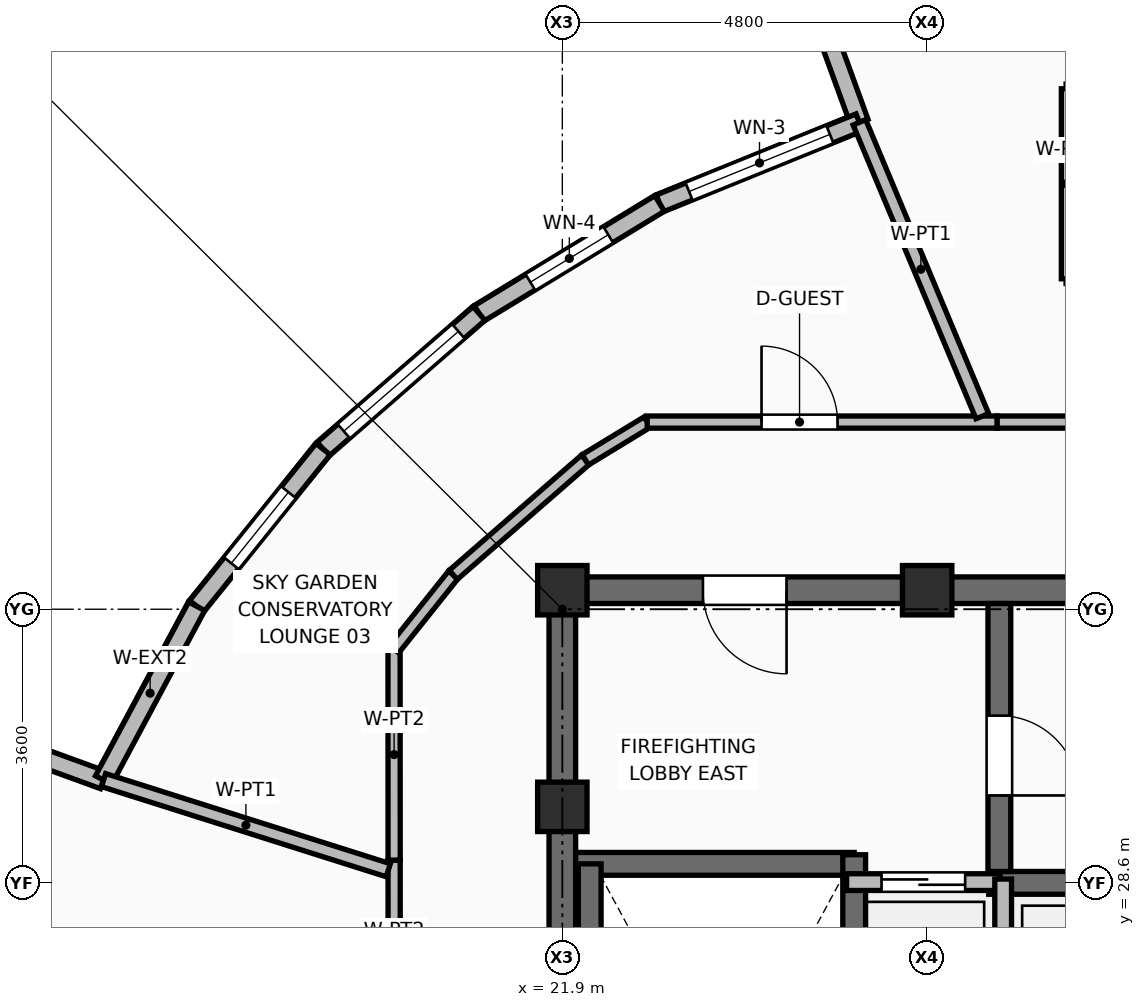
"""IFC4 building model, lengths in metres.
Left out: names, types, materials, properties, quantities, classifications, styles, units other than length and angle.
Written with IfcOpenShell. Run it as: python <this file> out.ifc"""

import sys

from ifc_helpers import new_model, si_unit, direction, frame, frame_2d, origin, origin_2d, place, context, subcontext, project, spatial, rectangle, extrude, element, fill, save


model = new_model("IFC4")
c1 = context("Model", 3, precision=1e-05, world=origin(), true_north=direction((0.0, 1.0)))
c2 = subcontext(c1, "Body", "Model", "MODEL_VIEW")
j1 = project(units=[si_unit("LENGTHUNIT", "METRE"), si_unit("PLANEANGLEUNIT", "RADIAN")], contexts=[c1])
p1 = place(None, origin())
s1 = spatial("IfcSite", under=j1, at=p1, CompositionType="ELEMENT")
p2 = place(p1, origin())
s2 = spatial("IfcBuilding", under=s1, at=p2, CompositionType="ELEMENT")
p3 = place(p2, frame((0.0, 0.0, 275.1)))
s3 = spatial("IfcBuildingStorey", under=s2, at=p3, CompositionType="ELEMENT", Elevation=275.1)
for number, where, z_axis, x_axis in (
    (1, (21.9, 29.6, 0.0), (0.0, 0.0, 1.0), (1.0, 0.0, 0.0)),
    (2, (21.9, 32.45, 0.0), (0.0, 0.0, 1.0), (1.0, 0.0, 0.0)),
    (3, (26.7, 32.45, 0.0), (0.0, 0.0, 1.0), (1.0, 0.0, 0.0)),
):
    element("IfcColumn", number, at=place(p3, frame(where, z_axis=z_axis, x_axis=x_axis)), inside=s3, PredefinedType="COLUMN", context=c2, shape_type="SweptSolid", body=[
        extrude(rectangle(XDim=0.65, YDim=0.65, at=origin_2d()), origin(), (0.0, 0.0, 1.0), 3.75),
    ])
for number, where, z_axis, x_axis in (
    (4, (24.646, 41.8, 0.0), (0.0, 0.0, 1.0), (0.342, -0.94, 0.0)),
    (5, (15.864, 29.952, 0.0), (0.0, 0.0, 1.0), (-0.94, 0.342, 0.0)),
):
    element("IfcWall", number, at=place(p3, frame(where, z_axis=z_axis, x_axis=x_axis)), inside=s3, PredefinedType="SOLIDWALL", context=c2, shape_type="SweptSolid", body=[
        extrude(rectangle(XDim=3.4, YDim=0.24, at=frame_2d((1.7, 0.0))), origin(), (0.0, 0.0, 1.0), 3.57),
    ])
p4 = place(p3, frame((25.809, 38.605, 0.0), z_axis=(0.0, 0.0, 1.0), x_axis=(-0.926613712396, -0.376014664608, 0.0)))
e6 = element("IfcWall", 6, at=p4, inside=s3, PredefinedType="SOLIDWALL", context=c2, shape_type="SweptSolid", body=[
    extrude(rectangle(XDim=2.837, YDim=0.24, at=frame_2d((1.419, 0.0))), origin(), (0.0, 0.0, 1.0), 3.57),
])
p5 = place(p4, frame((0.419, 0.0, 0.85)))
e7 = element("IfcOpeningElement", 7, at=p5, cuts=e6, PredefinedType="OPENING", context=c2, shape_type="SweptSolid", body=[
    extrude(rectangle(XDim=2.0, YDim=2.4, at=frame_2d((1.0, 1.2))), frame((0.0, 0.13, 0.0), z_axis=(0.0, -1.0, 0.0), x_axis=(1.0, 0.0, 0.0)), (0.0, 0.0, 1.0), 0.26),
])
p6 = place(p3, frame((23.18, 37.538, 0.0), z_axis=(0.0, 0.0, 1.0), x_axis=(-0.854074820895, -0.520150170925, 0.0)))
e8 = element("IfcWall", 8, at=p6, inside=s3, PredefinedType="SOLIDWALL", context=c2, shape_type="SweptSolid", body=[
    extrude(rectangle(XDim=2.782, YDim=0.24, at=frame_2d((1.391, 0.0))), origin(), (0.0, 0.0, 1.0), 3.57),
])
p7 = place(p6, frame((0.791, 0.0, 0.85)))
e9 = element("IfcOpeningElement", 9, at=p7, cuts=e8, PredefinedType="OPENING", context=c2, shape_type="SweptSolid", body=[
    extrude(rectangle(XDim=1.2, YDim=1.8, at=frame_2d((0.6, 0.9))), frame((0.0, 0.13, 0.0), z_axis=(0.0, -1.0, 0.0), x_axis=(1.0, 0.0, 0.0)), (0.0, 0.0, 1.0), 0.26),
])
p8 = place(p3, frame((20.804, 36.091, 0.0), z_axis=(0.0, 0.0, 1.0), x_axis=(-0.754303896014, -0.656525424075, 0.0)))
e10 = element("IfcWall", 10, at=p8, inside=s3, PredefinedType="SOLIDWALL", context=c2, shape_type="SweptSolid", body=[
    extrude(rectangle(XDim=2.719, YDim=0.24, at=frame_2d((1.359, 0.0))), origin(), (0.0, 0.0, 1.0), 3.57),
])
p9 = place(p8, frame((0.359, 0.0, 0.85)))
e11 = element("IfcOpeningElement", 11, at=p9, cuts=e10, PredefinedType="OPENING", context=c2, shape_type="SweptSolid", body=[
    extrude(rectangle(XDim=2.0, YDim=2.4, at=frame_2d((1.0, 1.2))), frame((0.0, 0.13, 0.0), z_axis=(0.0, -1.0, 0.0), x_axis=(1.0, 0.0, 0.0)), (0.0, 0.0, 1.0), 0.26),
])
p10 = place(p3, frame((18.753, 34.306, 0.0), z_axis=(0.0, 0.0, 1.0), x_axis=(-0.627059794428, -0.778971125403, 0.0)))
e12 = element("IfcWall", 12, at=p10, inside=s3, PredefinedType="SOLIDWALL", context=c2, shape_type="SweptSolid", body=[
    extrude(rectangle(XDim=2.653, YDim=0.24, at=frame_2d((1.327, 0.0))), origin(), (0.0, 0.0, 1.0), 3.57),
])
p11 = place(p10, frame((0.727, 0.0, 0.85)))
e13 = element("IfcOpeningElement", 13, at=p11, cuts=e12, PredefinedType="OPENING", context=c2, shape_type="SweptSolid", body=[
    extrude(rectangle(XDim=1.2, YDim=1.8, at=frame_2d((0.6, 0.9))), frame((0.0, 0.13, 0.0), z_axis=(0.0, -1.0, 0.0), x_axis=(1.0, 0.0, 0.0)), (0.0, 0.0, 1.0), 0.26),
])
p12 = place(p3, frame((17.089, 32.239, 0.0), z_axis=(0.0, 0.0, 1.0), x_axis=(-0.472179632466, -0.881502350924, 0.0)))
e14 = element("IfcWall", 14, at=p12, inside=s3, PredefinedType="SOLIDWALL", context=c2, shape_type="SweptSolid", body=[
    extrude(rectangle(XDim=2.594, YDim=0.24, at=frame_2d((1.297, 0.0))), origin(), (0.0, 0.0, 1.0), 3.57),
])
p13 = place(p3, frame((21.725, 32.45, 0.0), z_axis=(0.0, 0.0, 1.0), x_axis=(1.0, 0.0, 0.0)))
e15 = element("IfcWall", 15, at=p13, inside=s3, PredefinedType="SHEAR", context=c2, shape_type="SweptSolid", body=[
    extrude(rectangle(XDim=19.55, YDim=0.35, at=frame_2d((9.775, 0.0))), origin(), (0.0, 0.0, 1.0), 3.57),
])
p14 = place(p13, frame((2.025, 0.0, 0.0)))
e16 = element("IfcOpeningElement", 16, at=p14, cuts=e15, PredefinedType="OPENING", context=c2, shape_type="SweptSolid", body=[
    extrude(rectangle(XDim=1.1, YDim=2.1, at=frame_2d((0.55, 1.05))), frame((0.0, 0.185, 0.0), z_axis=(0.0, -1.0, 0.0), x_axis=(1.0, 0.0, 0.0)), (0.0, 0.0, 1.0), 0.37),
])
p15 = place(p13, frame((15.415, 0.0, 0.0)))
e17 = element("IfcOpeningElement", 17, at=p15, cuts=e15, PredefinedType="OPENING", context=c2, shape_type="SweptSolid", body=[
    extrude(rectangle(XDim=1.0, YDim=2.1, at=frame_2d((0.5, 1.05))), frame((0.0, 0.185, 0.0), z_axis=(0.0, -1.0, 0.0), x_axis=(1.0, 0.0, 0.0)), (0.0, 0.0, 1.0), 0.37),
])
p16 = place(p13, frame((17.425, 0.0, 0.0)))
e18 = element("IfcOpeningElement", 18, at=p16, cuts=e15, PredefinedType="OPENING", context=c2, shape_type="SweptSolid", body=[
    extrude(rectangle(XDim=0.9, YDim=2.1, at=frame_2d((0.45, 1.05))), frame((0.0, 0.185, 0.0), z_axis=(0.0, -1.0, 0.0), x_axis=(1.0, 0.0, 0.0)), (0.0, 0.0, 1.0), 0.37),
])
p17 = place(p3, frame((21.9, 17.975, 0.0), z_axis=(0.0, 0.0, 1.0), x_axis=(0.0, 1.0, 0.0)))
e19 = element("IfcWall", 19, at=p17, inside=s3, PredefinedType="SHEAR", context=c2, shape_type="SweptSolid", body=[
    extrude(rectangle(XDim=14.3, YDim=0.35, at=frame_2d((7.15, 0.0))), origin(), (0.0, 0.0, 1.0), 3.57),
])
p18 = place(p3, frame((22.075, 28.85, 0.0), z_axis=(0.0, 0.0, 1.0), x_axis=(1.0, 0.0, 0.0)))
e20 = element("IfcWall", 20, at=p18, inside=s3, PredefinedType="SHEAR", context=c2, shape_type="SweptSolid", body=[
    extrude(rectangle(XDim=3.665, YDim=0.3, at=frame_2d((1.833, 0.0))), origin(), (0.0, 0.0, 1.0), 3.57),
])
p19 = place(p3, frame((25.74, 20.98, 0.0), z_axis=(0.0, 0.0, 1.0), x_axis=(0.0, 1.0, 0.0)))
e21 = element("IfcWall", 21, at=p19, inside=s3, PredefinedType="SHEAR", context=c2, shape_type="SweptSolid", body=[
    extrude(rectangle(XDim=7.99, YDim=0.3, at=frame_2d((3.995, 0.0))), origin(), (0.0, 0.0, 1.0), 3.57),
])
p20 = place(p3, frame((22.26, 21.1, 0.0), z_axis=(0.0, 0.0, 1.0), x_axis=(0.0, 1.0, 0.0)))
e22 = element("IfcWall", 22, at=p20, inside=s3, PredefinedType="SHEAR", context=c2, shape_type="SweptSolid", body=[
    extrude(rectangle(XDim=7.75, YDim=0.3, at=frame_2d((3.875, 0.0))), origin(), (0.0, 0.0, 1.0), 3.57),
])
p21 = place(p3, frame((27.51, 28.6, 0.0), z_axis=(0.0, 0.0, 1.0), x_axis=(1.0, 0.0, 0.0)))
e23 = element("IfcWall", 23, at=p21, inside=s3, PredefinedType="SHEAR", context=c2, shape_type="SweptSolid", body=[
    extrude(rectangle(XDim=8.03, YDim=0.3, at=frame_2d((4.015, 0.0))), origin(), (0.0, 0.0, 1.0), 3.57),
])
p22 = place(p3, frame((27.65, 28.75, 0.0), z_axis=(0.0, 0.0, 1.0), x_axis=(0.0, 1.0, 0.0)))
e24 = element("IfcWall", 24, at=p22, inside=s3, PredefinedType="SHEAR", context=c2, shape_type="SweptSolid", body=[
    extrude(rectangle(XDim=3.525, YDim=0.3, at=frame_2d((1.762, 0.0))), origin(), (0.0, 0.0, 1.0), 3.57),
])
p23 = place(p22, frame((1.0, 0.0, 0.0)))
e25 = element("IfcOpeningElement", 25, at=p23, cuts=e24, PredefinedType="OPENING", context=c2, shape_type="SweptSolid", body=[
    extrude(rectangle(XDim=1.05, YDim=2.1, at=frame_2d((0.525, 1.05))), frame((0.0, 0.16, 0.0), z_axis=(0.0, -1.0, 0.0), x_axis=(1.0, 0.0, 0.0)), (0.0, 0.0, 1.0), 0.32),
])
p24 = place(p3, frame((25.64, 28.61, 0.0), z_axis=(0.0, 0.0, 1.0), x_axis=(1.0, 0.0, 0.0)))
e26 = element("IfcWall", 26, at=p24, inside=s3, PredefinedType="PARTITIONING", context=c2, shape_type="SweptSolid", body=[
    extrude(rectangle(XDim=2.02, YDim=0.22, at=frame_2d((1.01, 0.0))), origin(), (0.0, 0.0, 1.0), 3.55),
])
p25 = place(p24, frame((0.46, 0.0, 0.0)))
e27 = element("IfcOpeningElement", 27, at=p25, cuts=e26, PredefinedType="OPENING", context=c2, shape_type="SweptSolid", body=[
    extrude(rectangle(XDim=1.1, YDim=2.2, at=frame_2d((0.55, 1.1))), frame((0.0, 0.12, 0.0), z_axis=(0.0, -1.0, 0.0), x_axis=(1.0, 0.0, 0.0)), (0.0, 0.0, 1.0), 0.24),
])
p26 = place(p3, frame((27.7, 25.65, 0.0), z_axis=(0.0, 0.0, 1.0), x_axis=(0.0, 1.0, 0.0)))
e28 = element("IfcWall", 28, at=p26, inside=s3, PredefinedType="PARTITIONING", context=c2, shape_type="SweptSolid", body=[
    extrude(rectangle(XDim=3.0, YDim=0.22, at=frame_2d((1.5, 0.0))), origin(), (0.0, 0.0, 1.0), 3.55),
])
p27 = place(p3, frame((19.688, 26.135, 0.0), z_axis=(0.0, 0.0, 1.0), x_axis=(-0.000353325656, 0.99999993758, 0.0)))
e29 = element("IfcWall", 29, at=p27, inside=s3, PredefinedType="PARTITIONING", context=c2, shape_type="SweptSolid", body=[
    extrude(rectangle(XDim=2.764, YDim=0.16, at=frame_2d((1.382, 0.0))), origin(), (0.0, 0.0, 1.0), 3.55),
])
p28 = place(p3, frame((19.687, 28.899, 0.0), z_axis=(0.0, 0.0, 1.0), x_axis=(-0.00035164833, 0.999999938172, 0.0)))
e30 = element("IfcWall", 30, at=p28, inside=s3, PredefinedType="PARTITIONING", context=c2, shape_type="SweptSolid", body=[
    extrude(rectangle(XDim=2.777, YDim=0.16, at=frame_2d((1.389, 0.0))), origin(), (0.0, 0.0, 1.0), 3.55),
])
p29 = place(p3, frame((19.686, 31.676, 0.0), z_axis=(0.0, 0.0, 1.0), x_axis=(0.623812554347, 0.781573986926, 0.0)))
e31 = element("IfcWall", 31, at=p29, inside=s3, PredefinedType="PARTITIONING", context=c2, shape_type="SweptSolid", body=[
    extrude(rectangle(XDim=1.249, YDim=0.16, at=frame_2d((0.625, 0.0))), origin(), (0.0, 0.0, 1.0), 3.132),
])
p30 = place(p3, frame((20.465, 32.652, 0.0), z_axis=(0.0, 0.0, 1.0), x_axis=(0.754005434477, 0.65686817915, 0.0)))
e32 = element("IfcWall", 32, at=p30, inside=s3, PredefinedType="PARTITIONING", context=c2, shape_type="SweptSolid", body=[
    extrude(rectangle(XDim=2.305, YDim=0.16, at=frame_2d((1.152, 0.0))), origin(), (0.0, 0.0, 1.0), 3.132),
])
p31 = place(p3, frame((22.203, 34.166, 0.0), z_axis=(0.0, 0.0, 1.0), x_axis=(0.853971019055, 0.52032057293, 0.0)))
e33 = element("IfcWall", 33, at=p31, inside=s3, PredefinedType="PARTITIONING", context=c2, shape_type="SweptSolid", body=[
    extrude(rectangle(XDim=0.953, YDim=0.16, at=frame_2d((0.477, 0.0))), origin(), (0.0, 0.0, 1.0), 3.55),
])
p32 = place(p3, frame((23.017, 34.662, 0.0), z_axis=(0.0, 0.0, 1.0), x_axis=(1.0, 0.0, 0.0)))
e34 = element("IfcWall", 34, at=p32, inside=s3, PredefinedType="PARTITIONING", context=c2, shape_type="SweptSolid", body=[
    extrude(rectangle(XDim=4.605, YDim=0.16, at=frame_2d((2.302, 0.0))), origin(), (0.0, 0.0, 1.0), 3.55),
])
p33 = place(p32, frame((1.504, 0.0, 0.0)))
e35 = element("IfcOpeningElement", 35, at=p33, cuts=e34, PredefinedType="OPENING", context=c2, shape_type="SweptSolid", body=[
    extrude(rectangle(XDim=1.0, YDim=2.1, at=frame_2d((0.5, 1.05))), frame((0.0, 0.09, 0.0), z_axis=(0.0, -1.0, 0.0), x_axis=(1.0, 0.0, 0.0)), (0.0, 0.0, 1.0), 0.18),
])
p34 = place(p3, frame((27.622, 34.662, 0.0), z_axis=(0.0, 0.0, 1.0), x_axis=(0.999999992592, -0.000121719654, 0.0)))
e36 = element("IfcWall", 36, at=p34, inside=s3, PredefinedType="PARTITIONING", context=c2, shape_type="SweptSolid", body=[
    extrude(rectangle(XDim=10.029, YDim=0.16, at=frame_2d((5.014, 0.0))), origin(), (0.0, 0.0, 1.0), 3.132),
])
p35 = place(p34, frame((4.34, 0.0, 0.0)))
e37 = element("IfcOpeningElement", 37, at=p35, cuts=e36, PredefinedType="OPENING", context=c2, shape_type="SweptSolid", body=[
    extrude(rectangle(XDim=1.2, YDim=2.1, at=frame_2d((0.6, 1.05))), frame((0.0, 0.09, 0.0), z_axis=(0.0, -1.0, 0.0), x_axis=(1.0, 0.0, 0.0)), (0.0, 0.0, 1.0), 0.18),
])
p36 = place(p3, frame((27.426, 34.74, 0.0), z_axis=(0.0, 0.0, 1.0), x_axis=(-0.385943200944, 0.92252254479, 0.0)))
e38 = element("IfcWall", 38, at=p36, inside=s3, PredefinedType="PARTITIONING", context=c2, shape_type="SweptSolid", body=[
    extrude(rectangle(XDim=4.19, YDim=0.18, at=frame_2d((2.095, 0.0))), origin(), (0.0, 0.0, 1.0), 3.55),
])
p37 = place(p3, frame((19.61, 28.766, 0.0), z_axis=(0.0, 0.0, 1.0), x_axis=(-0.953376791754, 0.301782525909, 0.0)))
e39 = element("IfcWall", 39, at=p37, inside=s3, PredefinedType="PARTITIONING", context=c2, shape_type="SweptSolid", body=[
    extrude(rectangle(XDim=3.929, YDim=0.18, at=frame_2d((1.965, 0.0))), origin(), (0.0, 0.0, 1.0), 3.55),
])
p38 = place(p3, frame((28.528, 36.547, 0.0), z_axis=(0.0, 0.0, 1.0), x_axis=(0.0, 1.0, 0.0)))
e40 = element("IfcWall", 40, at=p38, inside=s3, PredefinedType="PARTITIONING", context=c2, shape_type="SweptSolid", body=[
    extrude(rectangle(XDim=2.5, YDim=0.125, at=frame_2d((1.25, 0.0))), origin(), (0.0, 0.0, 1.0), 3.55),
])
p39 = place(p5, origin())
e41 = element("IfcWindow", 41, at=p39, inside=s3, PartitioningType="SINGLE_PANEL", PredefinedType="WINDOW", context=c2, shape_type="SweptSolid", body=[
    extrude(rectangle(XDim=2.0, YDim=2.4, at=frame_2d((1.0, 1.2))), frame((0.0, 0.03, 0.0), z_axis=(0.0, -1.0, 0.0), x_axis=(1.0, 0.0, 0.0)), (0.0, 0.0, 1.0), 0.06),
])
fill(e7, e41)
p40 = place(p7, origin())
e42 = element("IfcWindow", 42, at=p40, inside=s3, PartitioningType="SINGLE_PANEL", PredefinedType="WINDOW", context=c2, shape_type="SweptSolid", body=[
    extrude(rectangle(XDim=1.2, YDim=1.8, at=frame_2d((0.6, 0.9))), frame((0.0, 0.03, 0.0), z_axis=(0.0, -1.0, 0.0), x_axis=(1.0, 0.0, 0.0)), (0.0, 0.0, 1.0), 0.06),
])
fill(e9, e42)
p41 = place(p9, origin())
e43 = element("IfcWindow", 43, at=p41, inside=s3, PartitioningType="SINGLE_PANEL", PredefinedType="WINDOW", context=c2, shape_type="SweptSolid", body=[
    extrude(rectangle(XDim=2.0, YDim=2.4, at=frame_2d((1.0, 1.2))), frame((0.0, 0.03, 0.0), z_axis=(0.0, -1.0, 0.0), x_axis=(1.0, 0.0, 0.0)), (0.0, 0.0, 1.0), 0.06),
])
fill(e11, e43)
p42 = place(p11, origin())
e44 = element("IfcWindow", 44, at=p42, inside=s3, PartitioningType="SINGLE_PANEL", PredefinedType="WINDOW", context=c2, shape_type="SweptSolid", body=[
    extrude(rectangle(XDim=1.2, YDim=1.8, at=frame_2d((0.6, 0.9))), frame((0.0, 0.03, 0.0), z_axis=(0.0, -1.0, 0.0), x_axis=(1.0, 0.0, 0.0)), (0.0, 0.0, 1.0), 0.06),
])
fill(e13, e44)
p43 = place(p23, frame((1.05, 0.0, 0.0), z_axis=(0.0, 0.0, 1.0), x_axis=(-1.0, 0.0, 0.0)))
e45 = element("IfcDoor", 45, at=p43, inside=s3, OperationType="SINGLE_SWING_RIGHT", PredefinedType="DOOR", context=c2, shape_type="SweptSolid", body=[
    extrude(rectangle(XDim=1.05, YDim=2.1, at=frame_2d((0.525, 1.05))), frame((0.0, 0.025, 0.0), z_axis=(0.0, -1.0, 0.0), x_axis=(1.0, 0.0, 0.0)), (0.0, 0.0, 1.0), 0.05),
])
fill(e25, e45)
p44 = place(p25, origin())
e46 = element("IfcDoor", 46, at=p44, inside=s3, OperationType="DOUBLE_DOOR_SLIDING", PredefinedType="DOOR", context=c2, shape_type="SweptSolid", body=[
    extrude(rectangle(XDim=1.1, YDim=2.2, at=frame_2d((0.55, 1.1))), frame((0.0, 0.025, 0.0), z_axis=(0.0, -1.0, 0.0), x_axis=(1.0, 0.0, 0.0)), (0.0, 0.0, 1.0), 0.05),
])
fill(e27, e46)
p45 = place(p14, frame((1.1, 0.0, 0.0), z_axis=(0.0, 0.0, 1.0), x_axis=(-1.0, 0.0, 0.0)))
e47 = element("IfcDoor", 47, at=p45, inside=s3, OperationType="SINGLE_SWING_LEFT", PredefinedType="DOOR", context=c2, shape_type="SweptSolid", body=[
    extrude(rectangle(XDim=1.1, YDim=2.1, at=frame_2d((0.55, 1.05))), frame((0.0, 0.025, 0.0), z_axis=(0.0, -1.0, 0.0), x_axis=(1.0, 0.0, 0.0)), (0.0, 0.0, 1.0), 0.05),
])
fill(e16, e47)
p46 = place(p33, origin())
e48 = element("IfcDoor", 48, at=p46, inside=s3, OperationType="SINGLE_SWING_LEFT", PredefinedType="DOOR", context=c2, shape_type="SweptSolid", body=[
    extrude(rectangle(XDim=1.0, YDim=2.1, at=frame_2d((0.5, 1.05))), frame((0.0, 0.025, 0.0), z_axis=(0.0, -1.0, 0.0), x_axis=(1.0, 0.0, 0.0)), (0.0, 0.0, 1.0), 0.05),
])
fill(e35, e48)
save(model, sys.argv[1])
